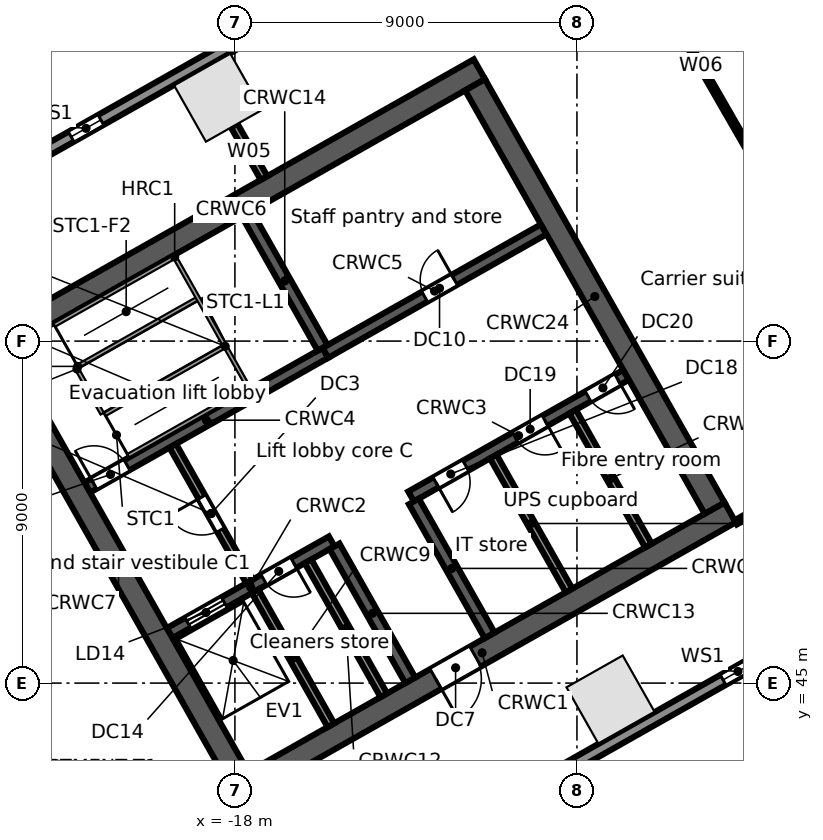
"""IFC4 building model, lengths in metres.
Left out: names, types, materials, properties, quantities, classifications, styles, units other than length and angle.
Written with IfcOpenShell. Run it as: python <this file> out.ifc"""

import sys

from ifc_helpers import new_model, si_unit, direction, frame, frame_2d, origin, origin_2d, place, context, subcontext, project, spatial, rectangle, extrude, element, fill, save


model = new_model("IFC4")
c1 = context("Model", 3, precision=1e-05, world=origin(), true_north=direction((0.0, 1.0)))
c2 = subcontext(c1, "Body", "Model", "MODEL_VIEW")
j1 = project(units=[si_unit("LENGTHUNIT", "METRE"), si_unit("PLANEANGLEUNIT", "RADIAN")], contexts=[c1])
p1 = place(None, origin())
s1 = spatial("IfcSite", under=j1, at=p1, CompositionType="ELEMENT")
p2 = place(p1, origin())
s2 = spatial("IfcBuilding", under=s1, at=p2, CompositionType="ELEMENT")
p3 = place(p2, frame((0.0, 0.0, 81.5)))
s3 = spatial("IfcBuildingStorey", under=s2, at=p3, CompositionType="ELEMENT", Elevation=81.5)
for number, where, z_axis, x_axis in (
    (1, (-18.441, 60.406, 0.0), (0.0, 0.0, 1.0), (-0.87, -0.492, 0.0)),
    (2, (-8.117, 44.568, 0.0), (0.0, 0.0, 1.0), (0.87, 0.492, 0.0)),
):
    element("IfcColumn", number, at=place(p3, frame(where, z_axis=z_axis, x_axis=x_axis)), inside=s3, PredefinedType="COLUMN", context=c2, shape_type="SweptSolid", body=[
        extrude(rectangle(XDim=1.7, YDim=1.7, at=origin_2d()), origin(), (0.0, 0.0, 1.0), 5.0),
    ])
p4 = place(p3, frame((-58.745, 38.764, 0.0), z_axis=(0.0, 0.0, 1.0), x_axis=(0.870355811726, 0.492423355453, 0.0)))
e3 = element("IfcWall", 3, at=p4, inside=s3, PredefinedType="STANDARD", context=c2, shape_type="SweptSolid", body=[
    extrude(rectangle(XDim=64.025, YDim=0.3, at=frame_2d((32.013, 0.0))), origin(), (0.0, 0.0, 1.0), 4.68),
])
p5 = place(p4, frame((60.122, 0.0, 0.6)))
e4 = element("IfcOpeningElement", 4, at=p5, cuts=e3, PredefinedType="OPENING", context=c2, shape_type="SweptSolid", body=[
    extrude(rectangle(XDim=0.9, YDim=3.2, at=frame_2d((0.45, 1.6))), frame((0.0, 0.16, 0.0), z_axis=(0.0, -1.0, 0.0), x_axis=(1.0, 0.0, 0.0)), (0.0, 0.0, 1.0), 0.32),
])
p6 = place(p4, frame((50.992, 0.0, 0.6)))
e5 = element("IfcOpeningElement", 5, at=p6, cuts=e3, PredefinedType="OPENING", context=c2, shape_type="SweptSolid", body=[
    extrude(rectangle(XDim=0.9, YDim=3.2, at=frame_2d((0.45, 1.6))), frame((0.0, 0.16, 0.0), z_axis=(0.0, -1.0, 0.0), x_axis=(1.0, 0.0, 0.0)), (0.0, 0.0, 1.0), 0.32),
])
p7 = place(p4, frame((41.862, 0.0, 0.6)))
e6 = element("IfcOpeningElement", 6, at=p7, cuts=e3, PredefinedType="OPENING", context=c2, shape_type="SweptSolid", body=[
    extrude(rectangle(XDim=0.9, YDim=3.2, at=frame_2d((0.45, 1.6))), frame((0.0, 0.16, 0.0), z_axis=(0.0, -1.0, 0.0), x_axis=(1.0, 0.0, 0.0)), (0.0, 0.0, 1.0), 0.32),
])
p8 = place(p4, frame((32.732, 0.0, 0.6)))
e7 = element("IfcOpeningElement", 7, at=p8, cuts=e3, PredefinedType="OPENING", context=c2, shape_type="SweptSolid", body=[
    extrude(rectangle(XDim=0.9, YDim=3.2, at=frame_2d((0.45, 1.6))), frame((0.0, 0.16, 0.0), z_axis=(0.0, -1.0, 0.0), x_axis=(1.0, 0.0, 0.0)), (0.0, 0.0, 1.0), 0.32),
])
p9 = place(p4, frame((23.602, 0.0, 0.6)))
e8 = element("IfcOpeningElement", 8, at=p9, cuts=e3, PredefinedType="OPENING", context=c2, shape_type="SweptSolid", body=[
    extrude(rectangle(XDim=0.9, YDim=3.2, at=frame_2d((0.45, 1.6))), frame((0.0, 0.16, 0.0), z_axis=(0.0, -1.0, 0.0), x_axis=(1.0, 0.0, 0.0)), (0.0, 0.0, 1.0), 0.32),
])
p10 = place(p4, frame((14.472, 0.0, 0.6)))
e9 = element("IfcOpeningElement", 9, at=p10, cuts=e3, PredefinedType="OPENING", context=c2, shape_type="SweptSolid", body=[
    extrude(rectangle(XDim=0.9, YDim=3.2, at=frame_2d((0.45, 1.6))), frame((0.0, 0.16, 0.0), z_axis=(0.0, -1.0, 0.0), x_axis=(1.0, 0.0, 0.0)), (0.0, 0.0, 1.0), 0.32),
])
p11 = place(p4, frame((5.342, 0.0, 0.6)))
e10 = element("IfcOpeningElement", 10, at=p11, cuts=e3, PredefinedType="OPENING", context=c2, shape_type="SweptSolid", body=[
    extrude(rectangle(XDim=0.9, YDim=3.2, at=frame_2d((0.45, 1.6))), frame((0.0, 0.16, 0.0), z_axis=(0.0, -1.0, 0.0), x_axis=(1.0, 0.0, 0.0)), (0.0, 0.0, 1.0), 0.32),
])
p12 = place(p3, frame((-0.055, 47.969, 0.0), z_axis=(0.0, 0.0, 1.0), x_axis=(-0.870355730478, -0.492423499058, 0.0)))
e11 = element("IfcWall", 11, at=p12, inside=s3, PredefinedType="STANDARD", context=c2, shape_type="SweptSolid", body=[
    extrude(rectangle(XDim=43.75, YDim=0.3, at=frame_2d((21.875, 0.0))), origin(), (0.0, 0.0, 1.0), 4.68),
])
p13 = place(p12, frame((39.977, 0.0, 0.6)))
e12 = element("IfcOpeningElement", 12, at=p13, cuts=e11, PredefinedType="OPENING", context=c2, shape_type="SweptSolid", body=[
    extrude(rectangle(XDim=0.9, YDim=3.2, at=frame_2d((0.45, 1.6))), frame((0.0, 0.16, 0.0), z_axis=(0.0, -1.0, 0.0), x_axis=(1.0, 0.0, 0.0)), (0.0, 0.0, 1.0), 0.32),
])
p14 = place(p12, frame((31.222, 0.0, 0.6)))
e13 = element("IfcOpeningElement", 13, at=p14, cuts=e11, PredefinedType="OPENING", context=c2, shape_type="SweptSolid", body=[
    extrude(rectangle(XDim=0.9, YDim=3.2, at=frame_2d((0.45, 1.6))), frame((0.0, 0.16, 0.0), z_axis=(0.0, -1.0, 0.0), x_axis=(1.0, 0.0, 0.0)), (0.0, 0.0, 1.0), 0.32),
])
p15 = place(p12, frame((22.468, 0.0, 0.6)))
e14 = element("IfcOpeningElement", 14, at=p15, cuts=e11, PredefinedType="OPENING", context=c2, shape_type="SweptSolid", body=[
    extrude(rectangle(XDim=0.9, YDim=3.2, at=frame_2d((0.45, 1.6))), frame((0.0, 0.16, 0.0), z_axis=(0.0, -1.0, 0.0), x_axis=(1.0, 0.0, 0.0)), (0.0, 0.0, 1.0), 0.32),
])
p16 = place(p12, frame((13.713, 0.0, 0.6)))
e15 = element("IfcOpeningElement", 15, at=p16, cuts=e11, PredefinedType="OPENING", context=c2, shape_type="SweptSolid", body=[
    extrude(rectangle(XDim=0.9, YDim=3.2, at=frame_2d((0.45, 1.6))), frame((0.0, 0.16, 0.0), z_axis=(0.0, -1.0, 0.0), x_axis=(1.0, 0.0, 0.0)), (0.0, 0.0, 1.0), 0.32),
])
p17 = place(p12, frame((4.959, 0.0, 0.6)))
e16 = element("IfcOpeningElement", 16, at=p17, cuts=e11, PredefinedType="OPENING", context=c2, shape_type="SweptSolid", body=[
    extrude(rectangle(XDim=0.9, YDim=3.2, at=frame_2d((0.45, 1.6))), frame((0.0, 0.16, 0.0), z_axis=(0.0, -1.0, 0.0), x_axis=(1.0, 0.0, 0.0)), (0.0, 0.0, 1.0), 0.32),
])
p18 = place(p3, frame((-18.024, 42.104, 0.0), z_axis=(0.0, 0.0, 1.0), x_axis=(0.870360574057, 0.492414937962, 0.0)))
e17 = element("IfcWall", 17, at=p18, inside=s3, PredefinedType="SOLIDWALL", context=c2, shape_type="SweptSolid", body=[
    extrude(rectangle(XDim=15.0, YDim=0.6, at=frame_2d((7.5, 0.0))), origin(), (0.0, 0.0, 1.0), 4.68),
])
p19 = place(p18, frame((6.1, 0.0, 0.0)))
e18 = element("IfcOpeningElement", 18, at=p19, cuts=e17, PredefinedType="OPENING", context=c2, shape_type="SweptSolid", body=[
    extrude(rectangle(XDim=1.2, YDim=2.1, at=frame_2d((0.6, 1.05))), frame((0.0, 0.31, 0.0), z_axis=(0.0, -1.0, 0.0), x_axis=(1.0, 0.0, 0.0)), (0.0, 0.0, 1.0), 0.62),
])
p20 = place(p3, frame((-19.718, 46.316, 0.0), z_axis=(0.0, 0.0, 1.0), x_axis=(0.870353963862, 0.492426621528, 0.0)))
e19 = element("IfcWall", 19, at=p20, inside=s3, PredefinedType="SOLIDWALL", context=c2, shape_type="SweptSolid", body=[
    extrude(rectangle(XDim=4.9, YDim=0.3, at=frame_2d((2.45, 0.0))), origin(), (0.0, 0.0, 1.0), 4.68),
])
p21 = place(p20, frame((0.55, 0.0, 0.0)))
e20 = element("IfcOpeningElement", 20, at=p21, cuts=e19, PredefinedType="OPENING", context=c2, shape_type="SweptSolid", body=[
    extrude(rectangle(XDim=1.1, YDim=2.1, at=frame_2d((0.55, 1.05))), frame((0.0, 0.16, 0.0), z_axis=(0.0, -1.0, 0.0), x_axis=(1.0, 0.0, 0.0)), (0.0, 0.0, 1.0), 0.32),
])
p22 = place(p20, frame((2.85, 0.0, 0.0)))
e21 = element("IfcOpeningElement", 21, at=p22, cuts=e19, PredefinedType="OPENING", context=c2, shape_type="SweptSolid", body=[
    extrude(rectangle(XDim=0.9, YDim=2.1, at=frame_2d((0.45, 1.05))), frame((0.0, 0.16, 0.0), z_axis=(0.0, -1.0, 0.0), x_axis=(1.0, 0.0, 0.0)), (0.0, 0.0, 1.0), 0.32),
])
p23 = place(p3, frame((-13.365, 49.911, 0.0), z_axis=(0.0, 0.0, 1.0), x_axis=(0.870340995471, 0.49244954219, 0.0)))
e22 = element("IfcWall", 22, at=p23, inside=s3, PredefinedType="SOLIDWALL", context=c2, shape_type="SweptSolid", body=[
    extrude(rectangle(XDim=6.5, YDim=0.3, at=frame_2d((3.25, 0.0))), origin(), (0.0, 0.0, 1.0), 4.68),
])
p24 = place(p23, frame((0.75, 0.0, 0.0)))
e23 = element("IfcOpeningElement", 23, at=p24, cuts=e22, PredefinedType="OPENING", context=c2, shape_type="SweptSolid", body=[
    extrude(rectangle(XDim=0.9, YDim=2.1, at=frame_2d((0.45, 1.05))), frame((0.0, 0.16, 0.0), z_axis=(0.0, -1.0, 0.0), x_axis=(1.0, 0.0, 0.0)), (0.0, 0.0, 1.0), 0.32),
])
p25 = place(p23, frame((3.15, 0.0, 0.0)))
e24 = element("IfcOpeningElement", 24, at=p25, cuts=e22, PredefinedType="OPENING", context=c2, shape_type="SweptSolid", body=[
    extrude(rectangle(XDim=0.9, YDim=2.1, at=frame_2d((0.45, 1.05))), frame((0.0, 0.16, 0.0), z_axis=(0.0, -1.0, 0.0), x_axis=(1.0, 0.0, 0.0)), (0.0, 0.0, 1.0), 0.32),
])
p26 = place(p23, frame((5.35, 0.0, 0.0)))
e25 = element("IfcOpeningElement", 25, at=p26, cuts=e22, PredefinedType="OPENING", context=c2, shape_type="SweptSolid", body=[
    extrude(rectangle(XDim=0.9, YDim=2.1, at=frame_2d((0.45, 1.05))), frame((0.0, 0.16, 0.0), z_axis=(0.0, -1.0, 0.0), x_axis=(1.0, 0.0, 0.0)), (0.0, 0.0, 1.0), 0.32),
])
p27 = place(p3, frame((-21.885, 50.146, 0.0), z_axis=(0.0, 0.0, 1.0), x_axis=(0.870359411463, 0.492416992881, 0.0)))
e26 = element("IfcWall", 26, at=p27, inside=s3, PredefinedType="SOLIDWALL", context=c2, shape_type="SweptSolid", body=[
    extrude(rectangle(XDim=7.2, YDim=0.3, at=frame_2d((3.6, 0.0))), origin(), (0.0, 0.0, 1.0), 4.68),
])
p28 = place(p27, frame((0.2, 0.0, 0.0)))
e27 = element("IfcOpeningElement", 27, at=p28, cuts=e26, PredefinedType="OPENING", context=c2, shape_type="SweptSolid", body=[
    extrude(rectangle(XDim=1.0, YDim=2.1, at=frame_2d((0.5, 1.05))), frame((0.0, 0.16, 0.0), z_axis=(0.0, -1.0, 0.0), x_axis=(1.0, 0.0, 0.0)), (0.0, 0.0, 1.0), 0.32),
])
p29 = place(p3, frame((-15.618, 53.691, 0.0), z_axis=(0.0, 0.0, 1.0), x_axis=(0.870356769198, 0.492421663121, 0.0)))
e28 = element("IfcWall", 28, at=p29, inside=s3, PredefinedType="SOLIDWALL", context=c2, shape_type="SweptSolid", body=[
    extrude(rectangle(XDim=6.6, YDim=0.3, at=frame_2d((3.3, 0.0))), origin(), (0.0, 0.0, 1.0), 4.68),
])
p30 = place(p29, frame((3.0, 0.0, 0.0)))
e29 = element("IfcOpeningElement", 29, at=p30, cuts=e28, PredefinedType="OPENING", context=c2, shape_type="SweptSolid", body=[
    extrude(rectangle(XDim=0.9, YDim=2.1, at=frame_2d((0.45, 1.05))), frame((0.0, 0.16, 0.0), z_axis=(0.0, -1.0, 0.0), x_axis=(1.0, 0.0, 0.0)), (0.0, 0.0, 1.0), 0.32),
])
p31 = place(p3, frame((-24.623, 53.767, 0.0), z_axis=(0.0, 0.0, 1.0), x_axis=(0.870356627484, 0.492421913601, 0.0)))
e30 = element("IfcWall", 30, at=p31, inside=s3, PredefinedType="SOLIDWALL", context=c2, shape_type="SweptSolid", body=[
    extrude(rectangle(XDim=15.0, YDim=0.6, at=frame_2d((7.5, 0.0))), origin(), (0.0, 0.0, 1.0), 4.68),
])
p32 = place(p3, frame((-24.214, 53.654, 0.0), z_axis=(0.0, 0.0, 1.0), x_axis=(0.492441221355, -0.870345703448, 0.0)))
e31 = element("IfcWall", 31, at=p32, inside=s3, PredefinedType="SOLIDWALL", context=c2, shape_type="SweptSolid", body=[
    extrude(rectangle(XDim=12.8, YDim=0.6, at=frame_2d((6.4, 0.0))), origin(), (0.0, 0.0, 1.0), 4.68),
])
p33 = place(p3, frame((-17.469, 47.417, 0.0), z_axis=(0.0, 0.0, 1.0), x_axis=(0.492440575896, -0.870346068648, 0.0)))
e32 = element("IfcWall", 32, at=p33, inside=s3, PredefinedType="SOLIDWALL", context=c2, shape_type="SweptSolid", body=[
    extrude(rectangle(XDim=4.05, YDim=0.2, at=frame_2d((2.025, 0.0))), origin(), (0.0, 0.0, 1.0), 4.68),
])
p34 = place(p3, frame((-19.635, 51.246, 0.0), z_axis=(0.0, 0.0, 1.0), x_axis=(0.492408451753, -0.87036424366, 0.0)))
e33 = element("IfcWall", 33, at=p34, inside=s3, PredefinedType="PARTITIONING", context=c2, shape_type="SweptSolid", body=[
    extrude(rectangle(XDim=4.1, YDim=0.2, at=frame_2d((2.05, 0.0))), origin(), (0.0, 0.0, 1.0), 4.68),
])
p35 = place(p34, frame((1.55, 0.0, 0.0)))
e34 = element("IfcOpeningElement", 34, at=p35, cuts=e33, PredefinedType="OPENING", context=c2, shape_type="SweptSolid", body=[
    extrude(rectangle(XDim=1.0, YDim=2.1, at=frame_2d((0.5, 1.05))), frame((0.0, 0.11, 0.0), z_axis=(0.0, -1.0, 0.0), x_axis=(1.0, 0.0, 0.0)), (0.0, 0.0, 1.0), 0.22),
])
p36 = place(p3, frame((-16.076, 48.205, 0.0), z_axis=(0.0, 0.0, 1.0), x_axis=(0.492394910396, -0.870371904542, 0.0)))
e35 = element("IfcWall", 35, at=p36, inside=s3, PredefinedType="SOLIDWALL", context=c2, shape_type="SweptSolid", body=[
    extrude(rectangle(XDim=4.05, YDim=0.2, at=frame_2d((2.025, 0.0))), origin(), (0.0, 0.0, 1.0), 4.68),
])
p37 = place(p3, frame((-15.379, 48.599, 0.0), z_axis=(0.0, 0.0, 1.0), x_axis=(0.492394910396, -0.870371904542, 0.0)))
e36 = element("IfcWall", 36, at=p37, inside=s3, PredefinedType="SOLIDWALL", context=c2, shape_type="SweptSolid", body=[
    extrude(rectangle(XDim=4.05, YDim=0.3, at=frame_2d((2.025, 0.0))), origin(), (0.0, 0.0, 1.0), 4.68),
])
p38 = place(p3, frame((-17.686, 57.347, 0.0), z_axis=(0.0, 0.0, 1.0), x_axis=(0.492420746998, -0.870357287513, 0.0)))
e37 = element("IfcWall", 37, at=p38, inside=s3, PredefinedType="SOLIDWALL", context=c2, shape_type="SweptSolid", body=[
    extrude(rectangle(XDim=4.05, YDim=0.3, at=frame_2d((2.025, 0.0))), origin(), (0.0, 0.0, 1.0), 4.68),
])
p39 = place(p3, frame((-13.291, 49.781, 0.0), z_axis=(0.0, 0.0, 1.0), x_axis=(0.492394910396, -0.870371904542, 0.0)))
e38 = element("IfcWall", 38, at=p39, inside=s3, PredefinedType="SOLIDWALL", context=c2, shape_type="SweptSolid", body=[
    extrude(rectangle(XDim=4.05, YDim=0.3, at=frame_2d((2.025, 0.0))), origin(), (0.0, 0.0, 1.0), 4.68),
])
p40 = place(p3, frame((-11.202, 50.962, 0.0), z_axis=(0.0, 0.0, 1.0), x_axis=(0.49241474071, -0.870360685654, 0.0)))
e39 = element("IfcWall", 39, at=p40, inside=s3, PredefinedType="PARTITIONING", context=c2, shape_type="SweptSolid", body=[
    extrude(rectangle(XDim=4.05, YDim=0.2, at=frame_2d((2.025, 0.0))), origin(), (0.0, 0.0, 1.0), 4.68),
])
p41 = place(p3, frame((-9.113, 52.144, 0.0), z_axis=(0.0, 0.0, 1.0), x_axis=(0.492394910396, -0.870371904542, 0.0)))
e40 = element("IfcWall", 40, at=p41, inside=s3, PredefinedType="PARTITIONING", context=c2, shape_type="SweptSolid", body=[
    extrude(rectangle(XDim=4.05, YDim=0.2, at=frame_2d((2.025, 0.0))), origin(), (0.0, 0.0, 1.0), 4.68),
])
p42 = place(p3, frame((-11.681, 60.744, 0.0), z_axis=(0.0, 0.0, 1.0), x_axis=(0.492426772896, -0.870353878221, 0.0)))
e41 = element("IfcWall", 41, at=p42, inside=s3, PredefinedType="SOLIDWALL", context=c2, shape_type="SweptSolid", body=[
    extrude(rectangle(XDim=12.8, YDim=0.6, at=frame_2d((6.4, 0.0))), origin(), (0.0, 0.0, 1.0), 4.68),
])
p43 = place(p3, frame((-18.018, 59.669, 0.0), z_axis=(0.0, 0.0, 1.0), x_axis=(0.494877399769, -0.868962806568, 0.0)))
e42 = element("IfcWall", 42, at=p43, inside=s3, PredefinedType="PARTITIONING", context=c2, shape_type="SweptSolid", body=[
    extrude(rectangle(XDim=1.584, YDim=0.2, at=frame_2d((0.792, 0.0))), origin(), (0.0, 0.0, 1.0), 4.26),
])
p44 = place(p3, frame((-8.931, 66.775, 0.0), z_axis=(0.0, 0.0, 1.0), x_axis=(0.498955759248, -0.866627457627, 0.0)))
e43 = element("IfcWall", 43, at=p44, inside=s3, PredefinedType="PARTITIONING", context=c2, shape_type="SweptSolid", body=[
    extrude(rectangle(XDim=12.794, YDim=0.125, at=frame_2d((6.397, 0.0))), origin(), (0.0, 0.0, 1.0), 3.76),
])
p45 = place(p3, frame((-4.821, 49.23, 0.0), z_axis=(0.0, 0.0, 1.0), x_axis=(0.870371217631, 0.492396124598, 0.0)))
e44 = element("IfcWall", 44, at=p45, inside=s3, PredefinedType="PARTITIONING", context=c2, shape_type="SweptSolid", body=[
    extrude(rectangle(XDim=2.659, YDim=0.125, at=frame_2d((1.329, 0.0))), origin(), (0.0, 0.0, 1.0), 4.68),
])
p46 = place(p7, origin())
e45 = element("IfcWindow", 45, at=p46, inside=s3, PartitioningType="SINGLE_PANEL", PredefinedType="WINDOW", context=c2, shape_type="SweptSolid", body=[
    extrude(rectangle(XDim=0.9, YDim=3.2, at=frame_2d((0.45, 1.6))), frame((0.0, 0.03, 0.0), z_axis=(0.0, -1.0, 0.0), x_axis=(1.0, 0.0, 0.0)), (0.0, 0.0, 1.0), 0.06),
])
fill(e6, e45)
p47 = place(p17, origin())
e46 = element("IfcWindow", 46, at=p47, inside=s3, PartitioningType="SINGLE_PANEL", PredefinedType="WINDOW", context=c2, shape_type="SweptSolid", body=[
    extrude(rectangle(XDim=0.9, YDim=3.2, at=frame_2d((0.45, 1.6))), frame((0.0, 0.03, 0.0), z_axis=(0.0, -1.0, 0.0), x_axis=(1.0, 0.0, 0.0)), (0.0, 0.0, 1.0), 0.06),
])
fill(e16, e46)
p48 = place(p21, origin())
e47 = element("IfcDoor", 47, at=p48, inside=s3, OperationType="DOUBLE_DOOR_SLIDING", PredefinedType="DOOR", context=c2, shape_type="SweptSolid", body=[
    extrude(rectangle(XDim=1.1, YDim=2.1, at=frame_2d((0.55, 1.05))), frame((0.0, 0.025, 0.0), z_axis=(0.0, -1.0, 0.0), x_axis=(1.0, 0.0, 0.0)), (0.0, 0.0, 1.0), 0.05),
])
fill(e20, e47)
p49 = place(p28, origin())
e48 = element("IfcDoor", 48, at=p49, inside=s3, OperationType="SINGLE_SWING_LEFT", PredefinedType="DOOR", context=c2, shape_type="SweptSolid", body=[
    extrude(rectangle(XDim=1.0, YDim=2.1, at=frame_2d((0.5, 1.05))), frame((0.0, 0.025, 0.0), z_axis=(0.0, -1.0, 0.0), x_axis=(1.0, 0.0, 0.0)), (0.0, 0.0, 1.0), 0.05),
])
fill(e27, e48)
p50 = place(p35, frame((1.0, 0.0, 0.0), z_axis=(0.0, 0.0, 1.0), x_axis=(-1.0, 0.0, 0.0)))
e49 = element("IfcDoor", 49, at=p50, inside=s3, OperationType="SINGLE_SWING_RIGHT", PredefinedType="DOOR", context=c2, shape_type="SweptSolid", body=[
    extrude(rectangle(XDim=1.0, YDim=2.1, at=frame_2d((0.5, 1.05))), frame((0.0, 0.025, 0.0), z_axis=(0.0, -1.0, 0.0), x_axis=(1.0, 0.0, 0.0)), (0.0, 0.0, 1.0), 0.05),
])
fill(e34, e49)
p51 = place(p19, frame((1.2, 0.0, 0.0), z_axis=(0.0, 0.0, 1.0), x_axis=(-1.0, 0.0, 0.0)))
e50 = element("IfcDoor", 50, at=p51, inside=s3, OperationType="SINGLE_SWING_RIGHT", PredefinedType="DOOR", context=c2, shape_type="SweptSolid", body=[
    extrude(rectangle(XDim=1.2, YDim=2.1, at=frame_2d((0.6, 1.05))), frame((0.0, 0.025, 0.0), z_axis=(0.0, -1.0, 0.0), x_axis=(1.0, 0.0, 0.0)), (0.0, 0.0, 1.0), 0.05),
])
fill(e18, e50)
p52 = place(p30, origin())
e51 = element("IfcDoor", 51, at=p52, inside=s3, OperationType="SINGLE_SWING_RIGHT", PredefinedType="DOOR", context=c2, shape_type="SweptSolid", body=[
    extrude(rectangle(XDim=0.9, YDim=2.1, at=frame_2d((0.45, 1.05))), frame((0.0, 0.025, 0.0), z_axis=(0.0, -1.0, 0.0), x_axis=(1.0, 0.0, 0.0)), (0.0, 0.0, 1.0), 0.05),
])
fill(e29, e51)
p53 = place(p22, frame((0.9, 0.0, 0.0), z_axis=(0.0, 0.0, 1.0), x_axis=(-1.0, 0.0, 0.0)))
e52 = element("IfcDoor", 52, at=p53, inside=s3, OperationType="SINGLE_SWING_LEFT", PredefinedType="DOOR", context=c2, shape_type="SweptSolid", body=[
    extrude(rectangle(XDim=0.9, YDim=2.1, at=frame_2d((0.45, 1.05))), frame((0.0, 0.025, 0.0), z_axis=(0.0, -1.0, 0.0), x_axis=(1.0, 0.0, 0.0)), (0.0, 0.0, 1.0), 0.05),
])
fill(e21, e52)
p54 = place(p24, frame((0.9, 0.0, 0.0), z_axis=(0.0, 0.0, 1.0), x_axis=(-1.0, 0.0, 0.0)))
e53 = element("IfcDoor", 53, at=p54, inside=s3, OperationType="SINGLE_SWING_RIGHT", PredefinedType="DOOR", context=c2, shape_type="SweptSolid", body=[
    extrude(rectangle(XDim=0.9, YDim=2.1, at=frame_2d((0.45, 1.05))), frame((0.0, 0.025, 0.0), z_axis=(0.0, -1.0, 0.0), x_axis=(1.0, 0.0, 0.0)), (0.0, 0.0, 1.0), 0.05),
])
fill(e23, e53)
p55 = place(p25, frame((0.9, 0.0, 0.0), z_axis=(0.0, 0.0, 1.0), x_axis=(-1.0, 0.0, 0.0)))
e54 = element("IfcDoor", 54, at=p55, inside=s3, OperationType="SINGLE_SWING_LEFT", PredefinedType="DOOR", context=c2, shape_type="SweptSolid", body=[
    extrude(rectangle(XDim=0.9, YDim=2.1, at=frame_2d((0.45, 1.05))), frame((0.0, 0.025, 0.0), z_axis=(0.0, -1.0, 0.0), x_axis=(1.0, 0.0, 0.0)), (0.0, 0.0, 1.0), 0.05),
])
fill(e24, e54)
p56 = place(p26, frame((0.9, 0.0, 0.0), z_axis=(0.0, 0.0, 1.0), x_axis=(-1.0, 0.0, 0.0)))
e55 = element("IfcDoor", 55, at=p56, inside=s3, OperationType="SINGLE_SWING_LEFT", PredefinedType="DOOR", context=c2, shape_type="SweptSolid", body=[
    extrude(rectangle(XDim=0.9, YDim=2.1, at=frame_2d((0.45, 1.05))), frame((0.0, 0.025, 0.0), z_axis=(0.0, -1.0, 0.0), x_axis=(1.0, 0.0, 0.0)), (0.0, 0.0, 1.0), 0.05),
])
fill(e25, e55)
save(model, sys.argv[1])
